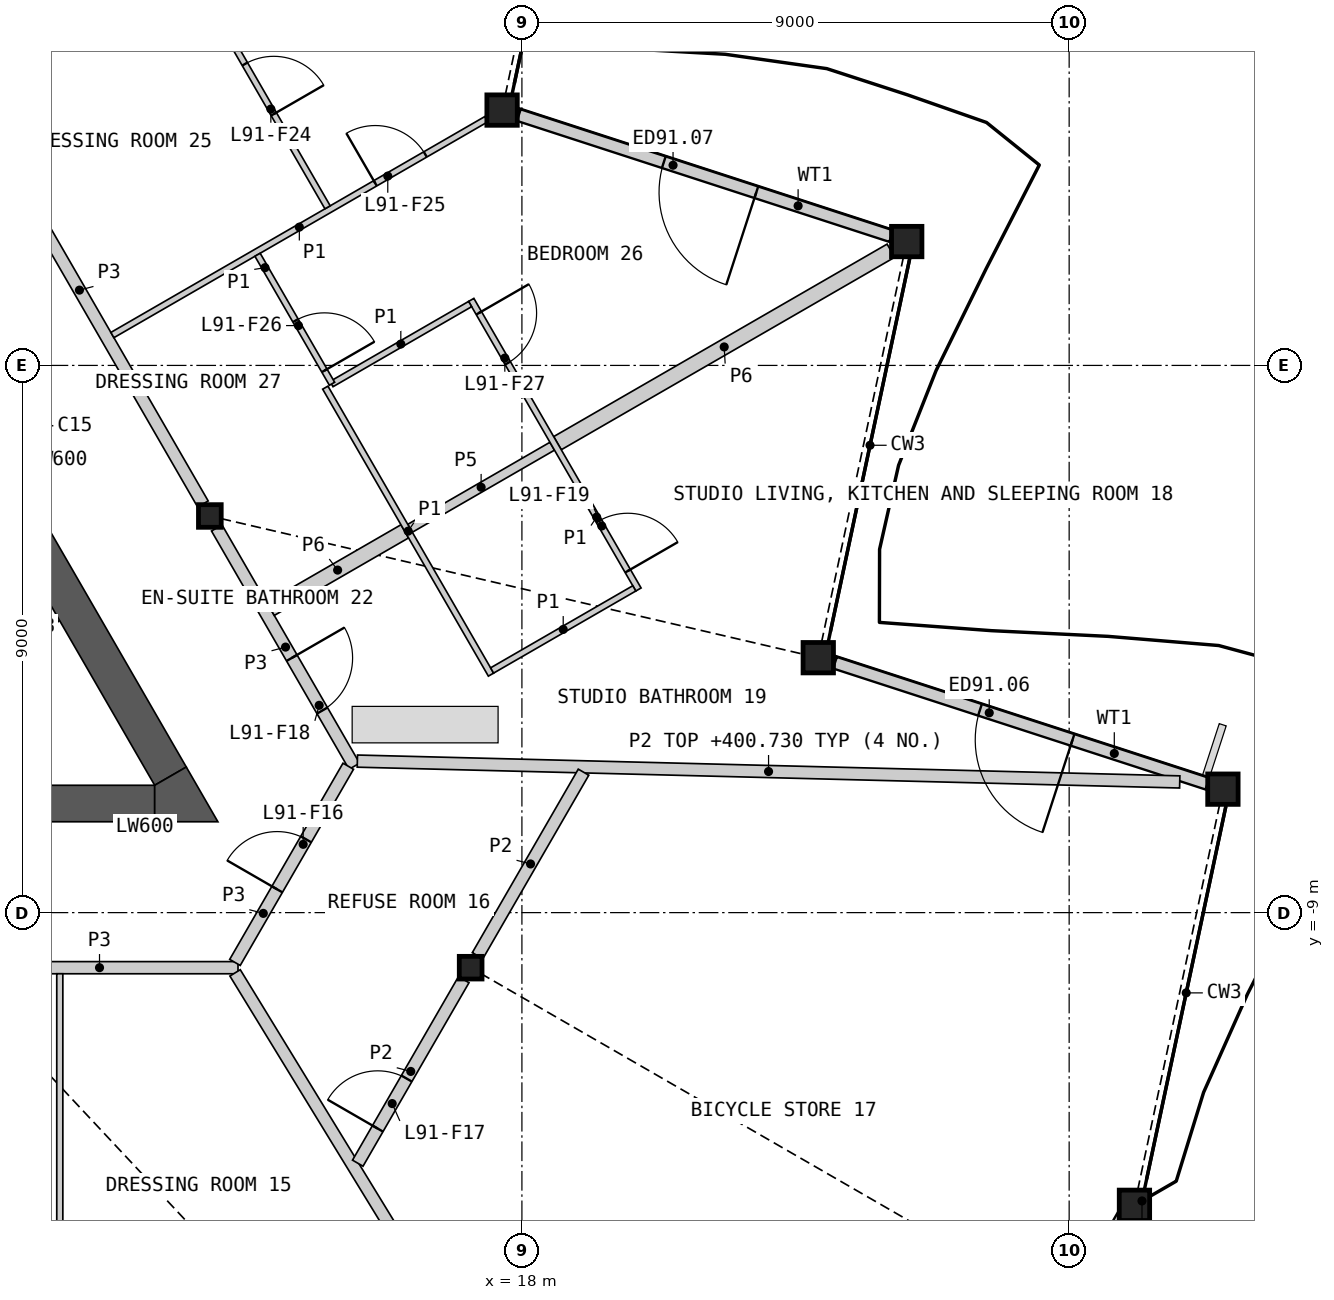
"""IFC4 building model, lengths in metres.
Left out: names, types, materials, properties, quantities, classifications, styles, units other than length and angle.
Written with IfcOpenShell. Run it as: python <this file> out.ifc"""

import sys

from ifc_helpers import new_model, si_unit, direction, frame, frame_2d, origin, origin_2d, place, context, subcontext, project, spatial, polyline, rectangle, hollow_rectangle, i_section, outline, extrude, element, fill, save


model = new_model("IFC4")
c1 = context("Model", 3, precision=1e-05, world=origin(), true_north=direction((0.0, 1.0)))
c2 = subcontext(c1, "Body", "Model", "MODEL_VIEW")
j1 = project(units=[si_unit("LENGTHUNIT", "METRE"), si_unit("PLANEANGLEUNIT", "RADIAN")], contexts=[c1])
p1 = place(None, origin())
s1 = spatial("IfcSite", under=j1, at=p1, CompositionType="ELEMENT")
p2 = place(p1, origin())
s2 = spatial("IfcBuilding", under=s1, at=p2, CompositionType="ELEMENT")
p3 = place(p2, frame((0.0, 0.0, 398.4)))
s3 = spatial("IfcBuildingStorey", under=s2, at=p3, CompositionType="ELEMENT", Elevation=398.4)
for number, where, z_axis, x_axis in (
    (1, (28.074, -13.814, 0.0), (0.0, 0.0, 1.0), (1.0, 0.0, 0.0)),
    (2, (29.529, -6.969, 0.0), (0.0, 0.0, 1.0), (1.0, 0.0, 0.0)),
    (3, (22.874, -4.807, 0.0), (0.0, 0.0, 1.0), (1.0, 0.0, 0.0)),
    (4, (24.329, 2.037, 0.0), (0.0, 0.0, 1.0), (1.0, 0.0, 0.0)),
    (5, (17.674, 4.199, 0.0), (0.0, 0.0, 1.0), (1.0, 0.0, 0.0)),
):
    element("IfcColumn", number, at=place(p3, frame(where, z_axis=z_axis, x_axis=x_axis)), inside=s3, PredefinedType="COLUMN", context=c2, shape_type="SweptSolid", body=[
        extrude(hollow_rectangle(XDim=0.5, YDim=0.5, WallThickness=0.03, at=origin_2d()), origin(), (0.0, 0.0, 1.0), 3.4),
    ])
for number, where, z_axis, x_axis in (
    (6, (17.157, -9.906, 0.0), (0.0, 0.0, 1.0), (1.0, 0.0, 0.0)),
    (7, (12.868, -2.476, 0.0), (0.0, 0.0, 1.0), (1.0, 0.0, 0.0)),
):
    element("IfcColumn", number, at=place(p3, frame(where, z_axis=z_axis, x_axis=x_axis)), inside=s3, PredefinedType="COLUMN", context=c2, shape_type="SweptSolid", body=[
        extrude(i_section(OverallWidth=0.374, OverallDepth=0.372, WebThickness=0.016, FlangeThickness=0.026, at=origin_2d()), origin(), (0.0, 0.0, 1.0), 3.4),
    ])
p4 = place(p3, frame((27.148, -15.31, 0.0), z_axis=(0.0, 0.0, 1.0), x_axis=(0.499931517724, 0.866064938435, 0.0)))
e8 = element("IfcWall", 8, at=p4, inside=s3, PredefinedType="SOLIDWALL", context=c2, shape_type="SweptSolid", body=[
    extrude(rectangle(XDim=1.516, YDim=0.25, at=frame_2d((0.758, 0.0))), origin(), (0.0, 0.0, 1.0), 2.634),
])
p5 = place(p3, frame((29.274, -6.88, 0.0), z_axis=(0.0, 0.0, 1.0), x_axis=(-0.951055516513, 0.309020071371, 0.0)))
e9 = element("IfcWall", 9, at=p5, inside=s3, PredefinedType="SOLIDWALL", context=c2, shape_type="SweptSolid", body=[
    extrude(rectangle(XDim=6.44, YDim=0.2, at=frame_2d((3.22, 0.0))), origin(), (0.0, 0.0, 1.0), 2.634),
])
p6 = place(p5, frame((2.333, 0.0, 0.0)))
e10 = element("IfcOpeningElement", 10, at=p6, cuts=e9, PredefinedType="OPENING", context=c2, shape_type="SweptSolid", body=[
    extrude(rectangle(XDim=1.6, YDim=2.25, at=frame_2d((0.8, 1.125))), frame((0.0, 0.11, 0.0), z_axis=(0.0, -1.0, 0.0), x_axis=(1.0, 0.0, 0.0)), (0.0, 0.0, 1.0), 0.22),
])
p7 = place(p3, frame((24.074, 2.127, 0.0), z_axis=(0.0, 0.0, 1.0), x_axis=(-0.951055516513, 0.309020071371, 0.0)))
e11 = element("IfcWall", 11, at=p7, inside=s3, PredefinedType="SOLIDWALL", context=c2, shape_type="SweptSolid", body=[
    extrude(rectangle(XDim=6.44, YDim=0.2, at=frame_2d((3.22, 0.0))), origin(), (0.0, 0.0, 1.0), 2.634),
])
p8 = place(p7, frame((2.333, 0.0, 0.0)))
e12 = element("IfcOpeningElement", 12, at=p8, cuts=e11, PredefinedType="OPENING", context=c2, shape_type="SweptSolid", body=[
    extrude(rectangle(XDim=1.6, YDim=2.25, at=frame_2d((0.8, 1.125))), frame((0.0, 0.11, 0.0), z_axis=(0.0, -1.0, 0.0), x_axis=(1.0, 0.0, 0.0)), (0.0, 0.0, 1.0), 0.22),
])
p9 = place(p3, origin())
e13 = element("IfcWall", 13, at=p9, inside=s3, PredefinedType="SHEAR", context=c2, shape_type="SweptSolid", body=[
    extrude(outline(polyline([(8.83, -6.881), (10.374, -4.206), (10.032, -4.298), (8.738, -6.539), (8.83, -6.881)])), origin(), (0.0, 0.0, 1.0), 3.1),
])
p10 = place(p3, origin())
e14 = element("IfcWall", 14, at=p10, inside=s3, PredefinedType="SHEAR", context=c2, shape_type="SweptSolid", body=[
    extrude(outline(polyline([(10.032, -4.298), (10.374, -4.206), (5.307, -1.281), (5.182, -1.498), (10.032, -4.298)])), origin(), (0.0, 0.0, 1.0), 3.1),
])
p11 = place(p3, frame((-4.892, -7.206, 0.0), z_axis=(0.0, 0.0, 1.0), x_axis=(1.0, 0.0, 0.0)))
e15 = element("IfcWall", 15, at=p11, inside=s3, PredefinedType="SHEAR", context=c2, shape_type="SweptSolid", body=[
    extrude(rectangle(XDim=16.853, YDim=0.6, at=frame_2d((8.426, 0.0))), origin(), (0.0, 0.0, 1.0), 3.1),
])
p12 = place(p3, frame((12.221, -6.756, 0.0), z_axis=(0.0, 0.0, 1.0), x_axis=(-0.50000604952, 0.866021911064, 0.0)))
e16 = element("IfcWall", 16, at=p12, inside=s3, PredefinedType="SHEAR", context=c2, shape_type="SweptSolid", body=[
    extrude(rectangle(XDim=4.869, YDim=0.6, at=frame_2d((2.434, 0.0))), origin(), (0.0, 0.0, 1.0), 3.1),
])
p13 = place(p3, origin())
e17 = element("IfcWall", 17, at=p13, inside=s3, PredefinedType="SHEAR", context=c2, shape_type="SweptSolid", body=[
    extrude(outline(polyline([(11.961, -7.506), (11.961, -6.906), (12.48, -6.606), (13.0, -7.506), (11.961, -7.506)])), origin(), (0.0, 0.0, 1.0), 3.1),
])
p14 = place(p3, frame((8.692, 4.756, 0.0), z_axis=(0.0, 0.0, 1.0), x_axis=(0.500001682468, -0.866024432409, 0.0)))
e18 = element("IfcWall", 18, at=p14, inside=s3, PredefinedType="PARTITIONING", context=c2, shape_type="SweptSolid", body=[
    extrude(rectangle(XDim=8.124, YDim=0.2, at=frame_2d((4.062, 0.0))), origin(), (0.0, 0.0, 1.0), 3.1),
])
p15 = place(p3, frame((18.585, -1.279, 0.0), z_axis=(0.0, 0.0, 1.0), x_axis=(0.866023139795, 0.500003921324, 0.0)))
e19 = element("IfcWall", 19, at=p15, inside=s3, PredefinedType="PARTITIONING", context=c2, shape_type="SweptSolid", body=[
    extrude(rectangle(XDim=6.332, YDim=0.25, at=frame_2d((3.166, 0.0))), origin(), (0.0, 0.0, 1.0), 2.33),
])
p16 = place(p3, frame((8.775, -9.906, 0.0), z_axis=(0.0, 0.0, 1.0), x_axis=(1.0, 0.0, 0.0)))
e20 = element("IfcWall", 20, at=p16, inside=s3, PredefinedType="PARTITIONING", context=c2, shape_type="SweptSolid", body=[
    extrude(rectangle(XDim=4.555, YDim=0.2, at=frame_2d((2.278, 0.0))), origin(), (0.0, 0.0, 1.0), 3.1),
])
p17 = place(p3, frame((12.981, -2.673, 0.0), z_axis=(0.0, 0.0, 1.0), x_axis=(0.499974648164, -0.866040040179, 0.0)))
e21 = element("IfcWall", 21, at=p17, inside=s3, PredefinedType="PARTITIONING", context=c2, shape_type="SweptSolid", body=[
    extrude(rectangle(XDim=4.525, YDim=0.2, at=frame_2d((2.263, 0.0))), origin(), (0.0, 0.0, 1.0), 3.1),
])
p18 = place(p17, frame((2.468, 0.0, 0.0)))
e22 = element("IfcOpeningElement", 22, at=p18, cuts=e21, PredefinedType="OPENING", context=c2, shape_type="SweptSolid", body=[
    extrude(rectangle(XDim=1.0, YDim=2.1, at=frame_2d((0.5, 1.05))), frame((0.0, 0.11, 0.0), z_axis=(0.0, -1.0, 0.0), x_axis=(1.0, 0.0, 0.0)), (0.0, 0.0, 1.0), 0.22),
])
p19 = place(p3, frame((13.281, -9.819, 0.0), z_axis=(0.0, 0.0, 1.0), x_axis=(0.499958791762, 0.866049194065, 0.0)))
e23 = element("IfcWall", 23, at=p19, inside=s3, PredefinedType="PARTITIONING", context=c2, shape_type="SweptSolid", body=[
    extrude(rectangle(XDim=3.726, YDim=0.2, at=frame_2d((1.863, 0.0))), origin(), (0.0, 0.0, 1.0), 3.1),
])
p20 = place(p19, frame((1.388, 0.0, 0.0)))
e24 = element("IfcOpeningElement", 24, at=p20, cuts=e23, PredefinedType="OPENING", context=c2, shape_type="SweptSolid", body=[
    extrude(rectangle(XDim=0.95, YDim=2.1, at=frame_2d((0.475, 1.05))), frame((0.0, 0.11, 0.0), z_axis=(0.0, -1.0, 0.0), x_axis=(1.0, 0.0, 0.0)), (0.0, 0.0, 1.0), 0.22),
])
p21 = place(p3, frame((13.865, -4.004, 0.0), z_axis=(0.0, 0.0, 1.0), x_axis=(0.866054858364, 0.499948979701, 0.0)))
e25 = element("IfcWall", 25, at=p21, inside=s3, PredefinedType="PARTITIONING", context=c2, shape_type="SweptSolid", body=[
    extrude(rectangle(XDim=2.55, YDim=0.25, at=frame_2d((1.275, 0.0))), origin(), (0.0, 0.0, 1.0), 2.33),
])
p22 = place(p3, frame((15.294, -6.508, 0.0), z_axis=(0.0, 0.0, 1.0), x_axis=(0.999679467074, -0.02531724927, 0.0)))
e26 = element("IfcWall", 26, at=p22, inside=s3, PredefinedType="PARTITIONING", context=c2, shape_type="SweptSolid", body=[
    extrude(rectangle(XDim=13.53, YDim=0.2, at=frame_2d((6.765, 0.0))), origin(), (0.0, 0.0, 1.0), 2.33),
])
p23 = place(p3, frame((13.283, -9.991, 0.0), z_axis=(0.0, 0.0, 1.0), x_axis=(0.521777294246, -0.853081740052, 0.0)))
e27 = element("IfcWall", 27, at=p23, inside=s3, PredefinedType="PARTITIONING", context=c2, shape_type="SweptSolid", body=[
    extrude(rectangle(XDim=13.908, YDim=0.2, at=frame_2d((6.954, 0.0))), origin(), (0.0, 0.0, 1.0), 2.33),
])
p24 = place(p3, frame((15.301, -13.121, 0.0), z_axis=(0.0, 0.0, 1.0), x_axis=(0.499981154543, 0.866036283941, 0.0)))
e28 = element("IfcWall", 28, at=p24, inside=s3, PredefinedType="PARTITIONING", context=c2, shape_type="SweptSolid", body=[
    extrude(rectangle(XDim=3.486, YDim=0.2, at=frame_2d((1.743, 0.0))), origin(), (0.0, 0.0, 1.0), 2.33),
])
p25 = place(p24, frame((0.657, 0.0, 0.0)))
e29 = element("IfcOpeningElement", 29, at=p25, cuts=e28, PredefinedType="OPENING", context=c2, shape_type="SweptSolid", body=[
    extrude(rectangle(XDim=0.95, YDim=2.1, at=frame_2d((0.475, 1.05))), frame((0.0, 0.11, 0.0), z_axis=(0.0, -1.0, 0.0), x_axis=(1.0, 0.0, 0.0)), (0.0, 0.0, 1.0), 0.22),
])
p26 = place(p3, frame((17.271, -9.708, 0.0), z_axis=(0.0, 0.0, 1.0), x_axis=(0.500011485685, 0.866018772419, 0.0)))
e30 = element("IfcWall", 30, at=p26, inside=s3, PredefinedType="PARTITIONING", context=c2, shape_type="SweptSolid", body=[
    extrude(rectangle(XDim=3.485, YDim=0.2, at=frame_2d((1.743, 0.0))), origin(), (0.0, 0.0, 1.0), 2.33),
])
p27 = place(p3, frame((16.16, -2.679, 0.0), z_axis=(0.0, 0.0, 1.0), x_axis=(0.866019956843, 0.50000943426, 0.0)))
e31 = element("IfcWall", 31, at=p27, inside=s3, PredefinedType="PLUMBINGWALL", context=c2, shape_type="SweptSolid", body=[
    extrude(rectangle(XDim=2.7, YDim=0.15, at=frame_2d((1.35, 0.0))), origin(), (0.0, 0.0, 1.0), 2.33),
])
p28 = place(p3, frame((10.4, -21.828, 0.0), z_axis=(0.0, 0.0, 1.0), x_axis=(0.0, 1.0, 0.0)))
e32 = element("IfcWall", 32, at=p28, inside=s3, PredefinedType="PARTITIONING", context=c2, shape_type="SweptSolid", body=[
    extrude(rectangle(XDim=11.822, YDim=0.1, at=frame_2d((5.911, 0.0))), origin(), (0.0, 0.0, 1.0), 2.33),
])
p29 = place(p28, frame((1.458, 0.0, 0.0)))
e33 = element("IfcOpeningElement", 33, at=p29, cuts=e32, PredefinedType="OPENING", context=c2, shape_type="SweptSolid", body=[
    extrude(rectangle(XDim=0.95, YDim=2.1, at=frame_2d((0.475, 1.05))), frame((0.0, 0.06, 0.0), z_axis=(0.0, -1.0, 0.0), x_axis=(1.0, 0.0, 0.0)), (0.0, 0.0, 1.0), 0.12),
])
p30 = place(p3, frame((8.775, 5.066, 0.0), z_axis=(0.0, 0.0, 1.0), x_axis=(0.866023724155, 0.500002909193, 0.0)))
e34 = element("IfcWall", 34, at=p30, inside=s3, PredefinedType="PARTITIONING", context=c2, shape_type="SweptSolid", body=[
    extrude(rectangle(XDim=11.655, YDim=0.1, at=frame_2d((5.827, 0.0))), origin(), (0.0, 0.0, 1.0), 2.33),
])
p31 = place(p30, frame((4.252, 0.0, 0.0)))
e35 = element("IfcOpeningElement", 35, at=p31, cuts=e34, PredefinedType="OPENING", context=c2, shape_type="SweptSolid", body=[
    extrude(rectangle(XDim=0.95, YDim=2.1, at=frame_2d((0.475, 1.05))), frame((0.0, 0.06, 0.0), z_axis=(0.0, -1.0, 0.0), x_axis=(1.0, 0.0, 0.0)), (0.0, 0.0, 1.0), 0.12),
])
p32 = place(p3, frame((11.265, 0.5, 0.0), z_axis=(0.0, 0.0, 1.0), x_axis=(0.866033839264, 0.499985389037, 0.0)))
e36 = element("IfcWall", 36, at=p32, inside=s3, PredefinedType="PARTITIONING", context=c2, shape_type="SweptSolid", body=[
    extrude(rectangle(XDim=7.1, YDim=0.1, at=frame_2d((3.55, 0.0))), origin(), (0.0, 0.0, 1.0), 2.33),
])
p33 = place(p32, frame((4.992, 0.0, 0.0)))
e37 = element("IfcOpeningElement", 37, at=p33, cuts=e36, PredefinedType="OPENING", context=c2, shape_type="SweptSolid", body=[
    extrude(rectangle(XDim=0.95, YDim=2.1, at=frame_2d((0.475, 1.05))), frame((0.0, 0.06, 0.0), z_axis=(0.0, -1.0, 0.0), x_axis=(1.0, 0.0, 0.0)), (0.0, 0.0, 1.0), 0.12),
])
p34 = place(p3, frame((14.767, -0.365, 0.0), z_axis=(0.0, 0.0, 1.0), x_axis=(0.500002931134, -0.866023711487, 0.0)))
e38 = element("IfcWall", 38, at=p34, inside=s3, PredefinedType="PARTITIONING", context=c2, shape_type="SweptSolid", body=[
    extrude(rectangle(XDim=5.45, YDim=0.1, at=frame_2d((2.725, 0.0))), origin(), (0.0, 0.0, 1.0), 2.33),
])
p35 = place(p3, frame((17.167, 1.078, 0.0), z_axis=(0.0, 0.0, 1.0), x_axis=(0.499996545922, -0.866027397988, 0.0)))
e39 = element("IfcWall", 39, at=p35, inside=s3, PredefinedType="PARTITIONING", context=c2, shape_type="SweptSolid", body=[
    extrude(rectangle(XDim=5.5, YDim=0.1, at=frame_2d((2.75, 0.0))), origin(), (0.0, 0.0, 1.0), 2.33),
])
p36 = place(p35, frame((4.199, 0.0, 0.0)))
e40 = element("IfcOpeningElement", 40, at=p36, cuts=e39, PredefinedType="OPENING", context=c2, shape_type="SweptSolid", body=[
    extrude(rectangle(XDim=0.95, YDim=2.1, at=frame_2d((0.475, 1.05))), frame((0.0, 0.06, 0.0), z_axis=(0.0, -1.0, 0.0), x_axis=(1.0, 0.0, 0.0)), (0.0, 0.0, 1.0), 0.12),
])
p37 = place(p35, frame((0.25, 0.0, 0.0)))
e41 = element("IfcOpeningElement", 41, at=p37, cuts=e39, PredefinedType="OPENING", context=c2, shape_type="SweptSolid", body=[
    extrude(rectangle(XDim=0.95, YDim=2.1, at=frame_2d((0.475, 1.05))), frame((0.0, 0.06, 0.0), z_axis=(0.0, -1.0, 0.0), x_axis=(1.0, 0.0, 0.0)), (0.0, 0.0, 1.0), 0.12),
])
p38 = place(p3, frame((12.254, 7.017, 0.0), z_axis=(0.0, 0.0, 1.0), x_axis=(0.500005610874, -0.86602216432, 0.0)))
e42 = element("IfcWall", 42, at=p38, inside=s3, PredefinedType="PARTITIONING", context=c2, shape_type="SweptSolid", body=[
    extrude(rectangle(XDim=5.1, YDim=0.1, at=frame_2d((2.55, 0.0))), origin(), (0.0, 0.0, 1.0), 2.33),
])
p39 = place(p38, frame((2.379, 0.0, 0.0)))
e43 = element("IfcOpeningElement", 43, at=p39, cuts=e42, PredefinedType="OPENING", context=c2, shape_type="SweptSolid", body=[
    extrude(rectangle(XDim=0.95, YDim=2.1, at=frame_2d((0.475, 1.05))), frame((0.0, 0.06, 0.0), z_axis=(0.0, -1.0, 0.0), x_axis=(1.0, 0.0, 0.0)), (0.0, 0.0, 1.0), 0.12),
])
p40 = place(p3, frame((17.51, -5.017, 0.0), z_axis=(0.0, 0.0, 1.0), x_axis=(0.866059108428, 0.4999416173, 0.0)))
e44 = element("IfcWall", 44, at=p40, inside=s3, PredefinedType="PARTITIONING", context=c2, shape_type="SweptSolid", body=[
    extrude(rectangle(XDim=2.7, YDim=0.1, at=frame_2d((1.35, 0.0))), origin(), (0.0, 0.0, 1.0), 2.33),
])
p41 = place(p3, frame((14.868, -0.307, 0.0), z_axis=(0.0, 0.0, 1.0), x_axis=(0.865997164422, 0.50004890882, 0.0)))
e45 = element("IfcWall", 45, at=p41, inside=s3, PredefinedType="PARTITIONING", context=c2, shape_type="SweptSolid", body=[
    extrude(rectangle(XDim=2.633, YDim=0.1, at=frame_2d((1.316, 0.0))), origin(), (0.0, 0.0, 1.0), 2.33),
])
p42 = place(p3, frame((8.488, 5.15, 0.0), z_axis=(0.0, 0.0, 1.0), x_axis=(0.866027727466, 0.499995975244, 0.0)))
e46 = element("IfcWall", 46, at=p42, inside=s3, PredefinedType="PARTITIONING", context=c2, shape_type="SweptSolid", body=[
    extrude(rectangle(XDim=2.73, YDim=0.1, at=frame_2d((1.365, 0.0))), origin(), (0.0, 0.0, 1.0), 2.33),
])
p43 = place(p3, frame((13.652, 1.82, 0.0), z_axis=(0.0, 0.0, 1.0), x_axis=(0.500018594424, -0.866014668023, 0.0)))
e47 = element("IfcWall", 47, at=p43, inside=s3, PredefinedType="PARTITIONING", context=c2, shape_type="SweptSolid", body=[
    extrude(rectangle(XDim=2.45, YDim=0.1, at=frame_2d((1.225, 0.0))), origin(), (0.0, 0.0, 1.0), 2.33),
])
p44 = place(p43, frame((1.25, 0.0, 0.0)))
e48 = element("IfcOpeningElement", 48, at=p44, cuts=e47, PredefinedType="OPENING", context=c2, shape_type="SweptSolid", body=[
    extrude(rectangle(XDim=0.95, YDim=2.1, at=frame_2d((0.475, 1.05))), frame((0.0, 0.06, 0.0), z_axis=(0.0, -1.0, 0.0), x_axis=(1.0, 0.0, 0.0)), (0.0, 0.0, 1.0), 0.12),
])
p45 = place(p6, origin())
e49 = element("IfcDoor", 49, at=p45, inside=s3, OperationType="DOUBLE_DOOR_SINGLE_SWING", PredefinedType="DOOR", context=c2, shape_type="SweptSolid", body=[
    extrude(rectangle(XDim=1.6, YDim=2.25, at=frame_2d((0.8, 1.125))), frame((0.0, 0.025, 0.0), z_axis=(0.0, -1.0, 0.0), x_axis=(1.0, 0.0, 0.0)), (0.0, 0.0, 1.0), 0.05),
])
fill(e10, e49)
p46 = place(p8, origin())
e50 = element("IfcDoor", 50, at=p46, inside=s3, OperationType="DOUBLE_DOOR_SINGLE_SWING", PredefinedType="DOOR", context=c2, shape_type="SweptSolid", body=[
    extrude(rectangle(XDim=1.6, YDim=2.25, at=frame_2d((0.8, 1.125))), frame((0.0, 0.025, 0.0), z_axis=(0.0, -1.0, 0.0), x_axis=(1.0, 0.0, 0.0)), (0.0, 0.0, 1.0), 0.05),
])
fill(e12, e50)
p47 = place(p20, origin())
e51 = element("IfcDoor", 51, at=p47, inside=s3, OperationType="SINGLE_SWING_LEFT", PredefinedType="DOOR", context=c2, shape_type="SweptSolid", body=[
    extrude(rectangle(XDim=0.95, YDim=2.1, at=frame_2d((0.475, 1.05))), frame((0.0, 0.025, 0.0), z_axis=(0.0, -1.0, 0.0), x_axis=(1.0, 0.0, 0.0)), (0.0, 0.0, 1.0), 0.05),
])
fill(e24, e51)
p48 = place(p25, origin())
e52 = element("IfcDoor", 52, at=p48, inside=s3, OperationType="SINGLE_SWING_LEFT", PredefinedType="DOOR", context=c2, shape_type="SweptSolid", body=[
    extrude(rectangle(XDim=0.95, YDim=2.1, at=frame_2d((0.475, 1.05))), frame((0.0, 0.025, 0.0), z_axis=(0.0, -1.0, 0.0), x_axis=(1.0, 0.0, 0.0)), (0.0, 0.0, 1.0), 0.05),
])
fill(e29, e52)
p49 = place(p18, origin())
e53 = element("IfcDoor", 53, at=p49, inside=s3, OperationType="SINGLE_SWING_LEFT", PredefinedType="DOOR", context=c2, shape_type="SweptSolid", body=[
    extrude(rectangle(XDim=1.0, YDim=2.1, at=frame_2d((0.5, 1.05))), frame((0.0, 0.025, 0.0), z_axis=(0.0, -1.0, 0.0), x_axis=(1.0, 0.0, 0.0)), (0.0, 0.0, 1.0), 0.05),
])
fill(e22, e53)
p50 = place(p36, origin())
e54 = element("IfcDoor", 54, at=p50, inside=s3, OperationType="SINGLE_SWING_RIGHT", PredefinedType="DOOR", context=c2, shape_type="SweptSolid", body=[
    extrude(rectangle(XDim=0.95, YDim=2.1, at=frame_2d((0.475, 1.05))), frame((0.0, 0.025, 0.0), z_axis=(0.0, -1.0, 0.0), x_axis=(1.0, 0.0, 0.0)), (0.0, 0.0, 1.0), 0.05),
])
fill(e40, e54)
p51 = place(p39, origin())
e55 = element("IfcDoor", 55, at=p51, inside=s3, OperationType="SINGLE_SWING_RIGHT", PredefinedType="DOOR", context=c2, shape_type="SweptSolid", body=[
    extrude(rectangle(XDim=0.95, YDim=2.1, at=frame_2d((0.475, 1.05))), frame((0.0, 0.025, 0.0), z_axis=(0.0, -1.0, 0.0), x_axis=(1.0, 0.0, 0.0)), (0.0, 0.0, 1.0), 0.05),
])
fill(e43, e55)
p52 = place(p33, origin())
e56 = element("IfcDoor", 56, at=p52, inside=s3, OperationType="SINGLE_SWING_LEFT", PredefinedType="DOOR", context=c2, shape_type="SweptSolid", body=[
    extrude(rectangle(XDim=0.95, YDim=2.1, at=frame_2d((0.475, 1.05))), frame((0.0, 0.025, 0.0), z_axis=(0.0, -1.0, 0.0), x_axis=(1.0, 0.0, 0.0)), (0.0, 0.0, 1.0), 0.05),
])
fill(e37, e56)
p53 = place(p44, origin())
e57 = element("IfcDoor", 57, at=p53, inside=s3, OperationType="SINGLE_SWING_RIGHT", PredefinedType="DOOR", context=c2, shape_type="SweptSolid", body=[
    extrude(rectangle(XDim=0.95, YDim=2.1, at=frame_2d((0.475, 1.05))), frame((0.0, 0.025, 0.0), z_axis=(0.0, -1.0, 0.0), x_axis=(1.0, 0.0, 0.0)), (0.0, 0.0, 1.0), 0.05),
])
fill(e48, e57)
p54 = place(p37, origin())
e58 = element("IfcDoor", 58, at=p54, inside=s3, OperationType="SINGLE_SWING_LEFT", PredefinedType="DOOR", context=c2, shape_type="SweptSolid", body=[
    extrude(rectangle(XDim=0.95, YDim=2.1, at=frame_2d((0.475, 1.05))), frame((0.0, 0.025, 0.0), z_axis=(0.0, -1.0, 0.0), x_axis=(1.0, 0.0, 0.0)), (0.0, 0.0, 1.0), 0.05),
])
fill(e41, e58)
save(model, sys.argv[1])
